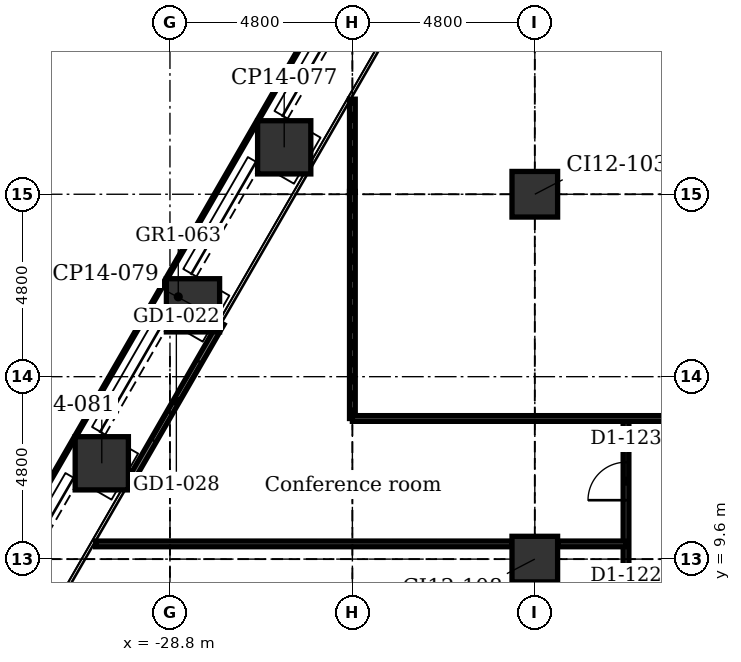
"""IFC4 building model, lengths in metres.
Left out: names, types, materials, properties, quantities, classifications, styles, units other than length and angle.
Written with IfcOpenShell. Run it as: python <this file> out.ifc"""

import sys

from ifc_helpers import new_model, si_unit, direction, frame, frame_2d, origin, origin_2d, place, context, subcontext, project, spatial, rectangle, extrude, element, fill, save


model = new_model("IFC4")
c1 = context("Model", 3, precision=1e-05, world=origin(), true_north=direction((0.0, 1.0)))
c2 = subcontext(c1, "Body", "Model", "MODEL_VIEW")
j1 = project(units=[si_unit("LENGTHUNIT", "METRE"), si_unit("PLANEANGLEUNIT", "RADIAN")], contexts=[c1])
p1 = place(None, origin())
s1 = spatial("IfcSite", under=j1, at=p1, CompositionType="ELEMENT")
p2 = place(p1, origin())
s2 = spatial("IfcBuilding", under=s1, at=p2, CompositionType="ELEMENT")
p3 = place(p2, frame((0.0, 0.0, 44.4)))
s3 = spatial("IfcBuildingStorey", under=s2, at=p3, CompositionType="ELEMENT", Elevation=44.4)
for number, where, z_axis, x_axis in (
    (1, (-30.594, 12.121, -0.25), (0.0, 0.0, 1.0), (0.5, 0.866, 0.0)),
    (2, (-28.194, 16.278, -0.25), (0.0, 0.0, 1.0), (0.5, 0.866, 0.0)),
    (3, (-25.794, 20.435, -0.25), (0.0, 0.0, 1.0), (0.5, 0.866, 0.0)),
):
    element("IfcColumn", number, at=place(p3, frame(where, z_axis=z_axis, x_axis=x_axis)), inside=s3, PredefinedType="COLUMN", context=c2, shape_type="SweptSolid", body=[
        extrude(rectangle(XDim=1.4, YDim=1.4, at=origin_2d()), origin(), (0.0, 0.0, 1.0), 5.5),
    ])
for number, where, z_axis, x_axis in (
    (4, (-19.2, 9.6, -0.25), (0.0, 0.0, 1.0), (1.0, 0.0, 0.0)),
    (5, (-19.2, 19.2, -0.25), (0.0, 0.0, 1.0), (1.0, 0.0, 0.0)),
):
    element("IfcColumn", number, at=place(p3, frame(where, z_axis=z_axis, x_axis=x_axis)), inside=s3, PredefinedType="COLUMN", context=c2, shape_type="SweptSolid", body=[
        extrude(rectangle(XDim=1.2, YDim=1.2, at=origin_2d()), origin(), (0.0, 0.0, 1.0), 5.5),
    ])
p4 = place(p3, frame((-29.817, 11.707, 0.0), z_axis=(0.0, 0.0, 1.0), x_axis=(0.499978080042, 0.866038058908, 0.0)))
e6 = element("IfcWall", 6, at=p4, inside=s3, PredefinedType="PARTITIONING", context=c2, shape_type="SweptSolid", body=[
    extrude(rectangle(XDim=4.74, YDim=0.16, at=frame_2d((2.37, 0.0))), origin(), (0.0, 0.0, 1.0), 5.25),
])
p5 = place(p4, frame((1.17, 0.0, 0.0)))
e7 = element("IfcOpeningElement", 7, at=p5, cuts=e6, PredefinedType="OPENING", context=c2, shape_type="SweptSolid", body=[
    extrude(rectangle(XDim=2.4, YDim=2.4, at=frame_2d((1.2, 1.2))), frame((0.0, 0.09, 0.0), z_axis=(0.0, -1.0, 0.0), x_axis=(1.0, 0.0, 0.0)), (0.0, 0.0, 1.0), 0.18),
])
p6 = place(p3, frame((-16.8, 3.95, 0.0), z_axis=(0.0, 0.0, 1.0), x_axis=(0.0, 1.0, 0.0)))
e8 = element("IfcWall", 8, at=p6, inside=s3, PredefinedType="PARTITIONING", context=c2, shape_type="SweptSolid", body=[
    extrude(rectangle(XDim=9.35, YDim=0.15, at=frame_2d((4.675, 0.0))), origin(), (0.0, 0.0, 1.0), 5.25),
])
p7 = place(p6, frame((3.615, 0.0, 0.0)))
e9 = element("IfcOpeningElement", 9, at=p7, cuts=e8, PredefinedType="OPENING", context=c2, shape_type="SweptSolid", body=[
    extrude(rectangle(XDim=1.0, YDim=2.1, at=frame_2d((0.5, 1.05))), frame((0.0, 0.085, 0.0), z_axis=(0.0, -1.0, 0.0), x_axis=(1.0, 0.0, 0.0)), (0.0, 0.0, 1.0), 0.17),
])
p8 = place(p6, frame((7.2, 0.0, 0.0)))
e10 = element("IfcOpeningElement", 10, at=p8, cuts=e8, PredefinedType="OPENING", context=c2, shape_type="SweptSolid", body=[
    extrude(rectangle(XDim=1.0, YDim=2.1, at=frame_2d((0.5, 1.05))), frame((0.0, 0.085, 0.0), z_axis=(0.0, -1.0, 0.0), x_axis=(1.0, 0.0, 0.0)), (0.0, 0.0, 1.0), 0.17),
])
p9 = place(p3, frame((-24.0, 13.3, 0.0), z_axis=(0.0, 0.0, 1.0), x_axis=(0.0, 1.0, 0.0)))
e11 = element("IfcWall", 11, at=p9, inside=s3, PredefinedType="PARTITIONING", context=c2, shape_type="SweptSolid", body=[
    extrude(rectangle(XDim=5.974, YDim=0.15, at=frame_2d((2.987, 0.0))), origin(), (0.0, 0.0, 1.0), 4.717),
])
p10 = place(p3, frame((-24.0, 19.274, 0.0), z_axis=(0.0, 0.0, 1.0), x_axis=(0.0, 1.0, 0.0)))
e12 = element("IfcWall", 12, at=p10, inside=s3, PredefinedType="PARTITIONING", context=c2, shape_type="SweptSolid", body=[
    extrude(rectangle(XDim=2.427, YDim=0.15, at=frame_2d((1.214, 0.0))), origin(), (0.0, 0.0, 1.0), 4.94),
])
p11 = place(p3, frame((-30.756, 10.0, 0.0), z_axis=(0.0, 0.0, 1.0), x_axis=(1.0, 0.0, 0.0)))
e13 = element("IfcWall", 13, at=p11, inside=s3, PredefinedType="PARTITIONING", context=c2, shape_type="SweptSolid", body=[
    extrude(rectangle(XDim=10.956, YDim=0.15, at=frame_2d((5.478, 0.0))), origin(), (0.0, 0.0, 1.0), 5.25),
])
p12 = place(p3, frame((-18.6, 10.0, 0.0), z_axis=(0.0, 0.0, 1.0), x_axis=(1.0, 0.0, 0.0)))
e14 = element("IfcWall", 14, at=p12, inside=s3, PredefinedType="PARTITIONING", context=c2, shape_type="SweptSolid", body=[
    extrude(rectangle(XDim=1.8, YDim=0.15, at=frame_2d((0.9, 0.0))), origin(), (0.0, 0.0, 1.0), 5.25),
])
p13 = place(p3, frame((-24.0, 13.3, 0.0), z_axis=(0.0, 0.0, 1.0), x_axis=(1.0, 0.0, 0.0)))
e15 = element("IfcWall", 15, at=p13, inside=s3, PredefinedType="PARTITIONING", context=c2, shape_type="SweptSolid", body=[
    extrude(rectangle(XDim=48.0, YDim=0.15, at=frame_2d((24.0, 0.0))), origin(), (0.0, 0.0, 1.0), 5.25),
])
p14 = place(p13, frame((9.1, 0.0, 0.0)))
e16 = element("IfcOpeningElement", 16, at=p14, cuts=e15, PredefinedType="OPENING", context=c2, shape_type="SweptSolid", body=[
    extrude(rectangle(XDim=1.0, YDim=2.1, at=frame_2d((0.5, 1.05))), frame((0.0, 0.085, 0.0), z_axis=(0.0, -1.0, 0.0), x_axis=(1.0, 0.0, 0.0)), (0.0, 0.0, 1.0), 0.17),
])
p15 = place(p13, frame((12.7, 0.0, 0.0)))
e17 = element("IfcOpeningElement", 17, at=p15, cuts=e15, PredefinedType="OPENING", context=c2, shape_type="SweptSolid", body=[
    extrude(rectangle(XDim=1.0, YDim=2.1, at=frame_2d((0.5, 1.05))), frame((0.0, 0.085, 0.0), z_axis=(0.0, -1.0, 0.0), x_axis=(1.0, 0.0, 0.0)), (0.0, 0.0, 1.0), 0.17),
])
p16 = place(p13, frame((15.675, 0.0, 0.0)))
e18 = element("IfcOpeningElement", 18, at=p16, cuts=e15, PredefinedType="OPENING", context=c2, shape_type="SweptSolid", body=[
    extrude(rectangle(XDim=1.0, YDim=2.1, at=frame_2d((0.5, 1.05))), frame((0.0, 0.085, 0.0), z_axis=(0.0, -1.0, 0.0), x_axis=(1.0, 0.0, 0.0)), (0.0, 0.0, 1.0), 0.17),
])
p17 = place(p13, frame((28.3, 0.0, 0.0)))
e19 = element("IfcOpeningElement", 19, at=p17, cuts=e15, PredefinedType="OPENING", context=c2, shape_type="SweptSolid", body=[
    extrude(rectangle(XDim=1.0, YDim=2.1, at=frame_2d((0.5, 1.05))), frame((0.0, 0.085, 0.0), z_axis=(0.0, -1.0, 0.0), x_axis=(1.0, 0.0, 0.0)), (0.0, 0.0, 1.0), 0.17),
])
p18 = place(p13, frame((37.425, 0.0, 0.0)))
e20 = element("IfcOpeningElement", 20, at=p18, cuts=e15, PredefinedType="OPENING", context=c2, shape_type="SweptSolid", body=[
    extrude(rectangle(XDim=1.8, YDim=2.1, at=frame_2d((0.9, 1.05))), frame((0.0, 0.085, 0.0), z_axis=(0.0, -1.0, 0.0), x_axis=(1.0, 0.0, 0.0)), (0.0, 0.0, 1.0), 0.17),
])
p19 = place(p13, frame((21.15, 0.0, 0.0)))
e21 = element("IfcOpeningElement", 21, at=p19, cuts=e15, PredefinedType="OPENING", context=c2, shape_type="SweptSolid", body=[
    extrude(rectangle(XDim=0.9, YDim=2.1, at=frame_2d((0.45, 1.05))), frame((0.0, 0.085, 0.0), z_axis=(0.0, -1.0, 0.0), x_axis=(1.0, 0.0, 0.0)), (0.0, 0.0, 1.0), 0.17),
])
p20 = place(p13, frame((18.15, 0.0, 0.0)))
e22 = element("IfcOpeningElement", 22, at=p20, cuts=e15, PredefinedType="OPENING", context=c2, shape_type="SweptSolid", body=[
    extrude(rectangle(XDim=0.9, YDim=2.1, at=frame_2d((0.45, 1.05))), frame((0.0, 0.085, 0.0), z_axis=(0.0, -1.0, 0.0), x_axis=(1.0, 0.0, 0.0)), (0.0, 0.0, 1.0), 0.17),
])
p21 = place(p13, frame((25.0, 0.0, 0.9)))
e23 = element("IfcOpeningElement", 23, at=p21, cuts=e15, PredefinedType="OPENING", context=c2, shape_type="SweptSolid", body=[
    extrude(rectangle(XDim=1.8, YDim=1.5, at=frame_2d((0.9, 0.75))), frame((0.0, 0.085, 0.0), z_axis=(0.0, -1.0, 0.0), x_axis=(1.0, 0.0, 0.0)), (0.0, 0.0, 1.0), 0.17),
])
p22 = place(p5, origin())
e24 = element("IfcDoor", 24, at=p22, inside=s3, OperationType="DOUBLE_DOOR_SLIDING", PredefinedType="DOOR", context=c2, shape_type="SweptSolid", body=[
    extrude(rectangle(XDim=2.4, YDim=2.4, at=frame_2d((1.2, 1.2))), frame((0.0, 0.025, 0.0), z_axis=(0.0, -1.0, 0.0), x_axis=(1.0, 0.0, 0.0)), (0.0, 0.0, 1.0), 0.05),
])
fill(e7, e24)
p23 = place(p8, origin())
e25 = element("IfcDoor", 25, at=p23, inside=s3, OperationType="SINGLE_SWING_LEFT", PredefinedType="DOOR", context=c2, shape_type="SweptSolid", body=[
    extrude(rectangle(XDim=1.0, YDim=2.1, at=frame_2d((0.5, 1.05))), frame((0.0, 0.025, 0.0), z_axis=(0.0, -1.0, 0.0), x_axis=(1.0, 0.0, 0.0)), (0.0, 0.0, 1.0), 0.05),
])
fill(e10, e25)
save(model, sys.argv[1])
